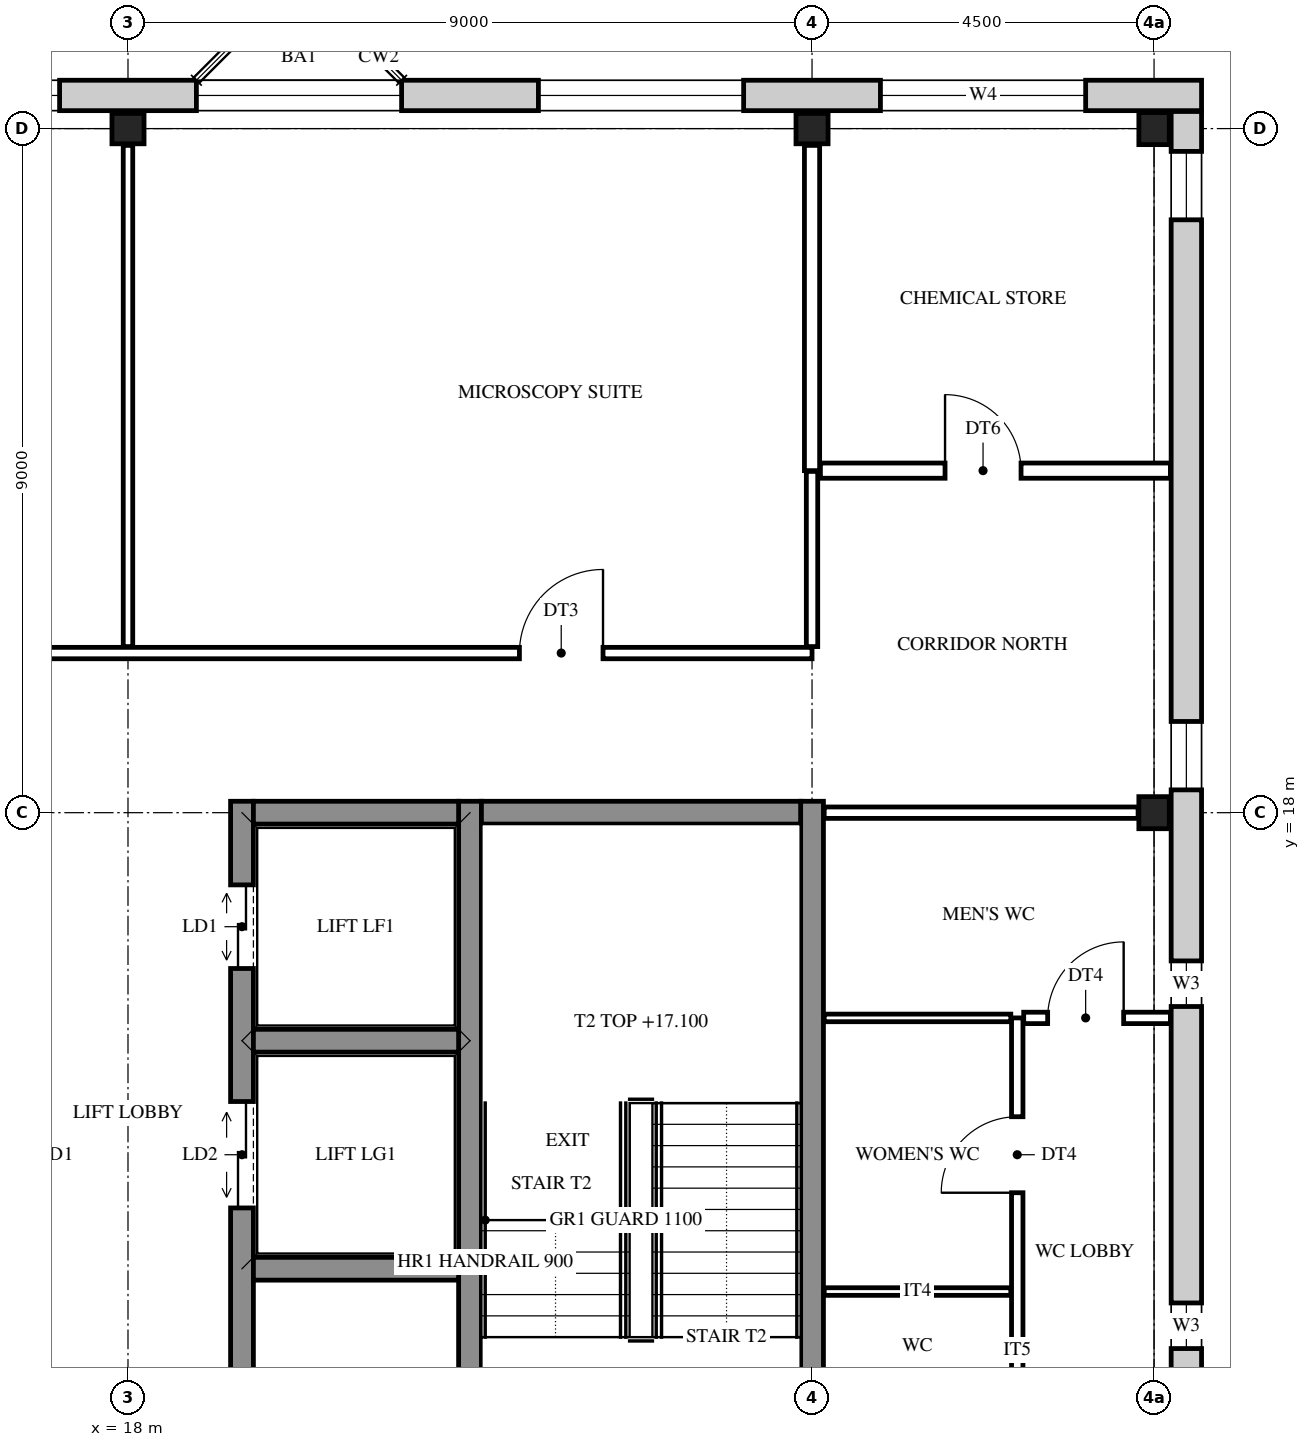
"""IFC4 building model, lengths in metres.
Left out: names, types, materials, properties, quantities, classifications, styles, units other than length and angle.
Written with IfcOpenShell. Run it as: python <this file> out.ifc"""

import sys

from ifc_helpers import new_model, si_unit, direction, frame, frame_2d, origin, origin_2d, place, context, subcontext, project, spatial, rectangle, i_section, extrude, element, fill, save


model = new_model("IFC4")
c1 = context("Model", 3, precision=1e-05, world=origin(), true_north=direction((0.0, 1.0)))
c2 = subcontext(c1, "Body", "Model", "MODEL_VIEW")
j1 = project(units=[si_unit("LENGTHUNIT", "METRE"), si_unit("PLANEANGLEUNIT", "RADIAN")], contexts=[c1])
p1 = place(None, origin())
s1 = spatial("IfcSite", under=j1, at=p1, CompositionType="ELEMENT")
p2 = place(p1, origin())
s2 = spatial("IfcBuilding", under=s1, at=p2, CompositionType="ELEMENT")
p3 = place(p2, frame((0.0, 0.0, 15.0)))
s3 = spatial("IfcBuildingStorey", under=s2, at=p3, CompositionType="ELEMENT", Elevation=15.0)
for number, where, z_axis, x_axis in (
    (1, (18.0, 27.0, 0.0), (0.0, 0.0, 1.0), (0.0, 1.0, 0.0)),
    (2, (27.0, 27.0, 0.0), (0.0, 0.0, 1.0), (0.0, 1.0, 0.0)),
    (3, (31.5, 18.0, 0.0), (0.0, 0.0, 1.0), (1.0, 0.0, 0.0)),
    (4, (31.5, 27.0, 0.0), (0.0, 0.0, 1.0), (1.0, 0.0, 0.0)),
):
    element("IfcColumn", number, at=place(p3, frame(where, z_axis=z_axis, x_axis=x_axis)), inside=s3, PredefinedType="COLUMN", context=c2, shape_type="SweptSolid", body=[
        extrude(i_section(OverallWidth=0.4, OverallDepth=0.422, WebThickness=0.028, FlangeThickness=0.036, at=origin_2d()), origin(), (0.0, 0.0, 1.0), 4.2),
    ])
p4 = place(p3, frame((19.5, 8.85, 0.0), z_axis=(0.0, 0.0, 1.0), x_axis=(0.0, 1.0, 0.0)))
e5 = element("IfcWall", 5, at=p4, inside=s3, PredefinedType="SHEAR", context=c2, shape_type="SweptSolid", body=[
    extrude(rectangle(XDim=9.3, YDim=0.3, at=frame_2d((4.65, 0.0))), origin(), (0.0, 0.0, 1.0), 4.2),
])
p5 = place(p4, frame((3.95, 0.0, 0.0)))
e6 = element("IfcOpeningElement", 6, at=p5, cuts=e5, PredefinedType="OPENING", context=c2, shape_type="SweptSolid", body=[
    extrude(rectangle(XDim=1.4, YDim=2.1, at=frame_2d((0.7, 1.05))), frame((0.0, 0.16, 0.0), z_axis=(0.0, -1.0, 0.0), x_axis=(1.0, 0.0, 0.0)), (0.0, 0.0, 1.0), 0.32),
])
p6 = place(p4, frame((7.1, 0.0, 0.0)))
e7 = element("IfcOpeningElement", 7, at=p6, cuts=e5, PredefinedType="OPENING", context=c2, shape_type="SweptSolid", body=[
    extrude(rectangle(XDim=1.1, YDim=2.1, at=frame_2d((0.55, 1.05))), frame((0.0, 0.16, 0.0), z_axis=(0.0, -1.0, 0.0), x_axis=(1.0, 0.0, 0.0)), (0.0, 0.0, 1.0), 0.32),
])
for number, where, z_axis, x_axis in (
    (8, (22.5, 8.85, 0.0), (0.0, 0.0, 1.0), (0.0, 1.0, 0.0)),
    (9, (27.0, 8.85, 0.0), (0.0, 0.0, 1.0), (0.0, 1.0, 0.0)),
):
    element("IfcWall", number, at=place(p3, frame(where, z_axis=z_axis, x_axis=x_axis)), inside=s3, PredefinedType="SHEAR", context=c2, shape_type="SweptSolid", body=[
        extrude(rectangle(XDim=9.3, YDim=0.3, at=frame_2d((4.65, 0.0))), origin(), (0.0, 0.0, 1.0), 4.2),
    ])
for number, where, z_axis, x_axis in (
    (10, (19.65, 12.0, 0.0), (0.0, 0.0, 1.0), (1.0, 0.0, 0.0)),
    (11, (19.65, 15.0, 0.0), (0.0, 0.0, 1.0), (1.0, 0.0, 0.0)),
    (12, (19.65, 18.0, 0.0), (0.0, 0.0, 1.0), (1.0, 0.0, 0.0)),
):
    element("IfcWall", number, at=place(p3, frame(where, z_axis=z_axis, x_axis=x_axis)), inside=s3, PredefinedType="SHEAR", context=c2, shape_type="SweptSolid", body=[
        extrude(rectangle(XDim=2.7, YDim=0.3, at=frame_2d((1.35, 0.0))), origin(), (0.0, 0.0, 1.0), 4.2),
    ])
p7 = place(p3, frame((22.65, 18.0, 0.0), z_axis=(0.0, 0.0, 1.0), x_axis=(1.0, 0.0, 0.0)))
e13 = element("IfcWall", 13, at=p7, inside=s3, PredefinedType="SHEAR", context=c2, shape_type="SweptSolid", body=[
    extrude(rectangle(XDim=4.2, YDim=0.3, at=frame_2d((2.1, 0.0))), origin(), (0.0, 0.0, 1.0), 4.2),
])
p8 = place(p3, frame((-0.625, 27.436, 0.0), z_axis=(0.0, 0.0, 1.0), x_axis=(1.0, 0.0, 0.0)))
e14 = element("IfcWall", 14, at=p8, inside=s3, PredefinedType="STANDARD", context=c2, shape_type="SweptSolid", body=[
    extrude(rectangle(XDim=32.75, YDim=0.4, at=frame_2d((16.375, 0.0))), origin(), (0.0, 0.0, 1.0), 4.2),
])
p9 = place(p8, frame((1.525, 0.0, 0.9)))
e15 = element("IfcOpeningElement", 15, at=p9, cuts=e14, PredefinedType="OPENING", context=c2, shape_type="SweptSolid", body=[
    extrude(rectangle(XDim=2.7, YDim=2.5, at=frame_2d((1.35, 1.25))), frame((0.0, 0.21, 0.0), z_axis=(0.0, -1.0, 0.0), x_axis=(1.0, 0.0, 0.0)), (0.0, 0.0, 1.0), 0.42),
])
p10 = place(p8, frame((6.025, 0.0, 0.9)))
e16 = element("IfcOpeningElement", 16, at=p10, cuts=e14, PredefinedType="OPENING", context=c2, shape_type="SweptSolid", body=[
    extrude(rectangle(XDim=2.7, YDim=2.5, at=frame_2d((1.35, 1.25))), frame((0.0, 0.21, 0.0), z_axis=(0.0, -1.0, 0.0), x_axis=(1.0, 0.0, 0.0)), (0.0, 0.0, 1.0), 0.42),
])
p11 = place(p8, frame((10.525, 0.0, 0.9)))
e17 = element("IfcOpeningElement", 17, at=p11, cuts=e14, PredefinedType="OPENING", context=c2, shape_type="SweptSolid", body=[
    extrude(rectangle(XDim=2.7, YDim=2.5, at=frame_2d((1.35, 1.25))), frame((0.0, 0.21, 0.0), z_axis=(0.0, -1.0, 0.0), x_axis=(1.0, 0.0, 0.0)), (0.0, 0.0, 1.0), 0.42),
])
p12 = place(p8, frame((15.025, 0.0, 0.9)))
e18 = element("IfcOpeningElement", 18, at=p12, cuts=e14, PredefinedType="OPENING", context=c2, shape_type="SweptSolid", body=[
    extrude(rectangle(XDim=2.7, YDim=2.5, at=frame_2d((1.35, 1.25))), frame((0.0, 0.21, 0.0), z_axis=(0.0, -1.0, 0.0), x_axis=(1.0, 0.0, 0.0)), (0.0, 0.0, 1.0), 0.42),
])
p13 = place(p8, frame((19.525, 0.0, 0.9)))
e19 = element("IfcOpeningElement", 19, at=p13, cuts=e14, PredefinedType="OPENING", context=c2, shape_type="SweptSolid", body=[
    extrude(rectangle(XDim=2.7, YDim=2.5, at=frame_2d((1.35, 1.25))), frame((0.0, 0.21, 0.0), z_axis=(0.0, -1.0, 0.0), x_axis=(1.0, 0.0, 0.0)), (0.0, 0.0, 1.0), 0.42),
])
p14 = place(p8, frame((24.025, 0.0, 0.9)))
e20 = element("IfcOpeningElement", 20, at=p14, cuts=e14, PredefinedType="OPENING", context=c2, shape_type="SweptSolid", body=[
    extrude(rectangle(XDim=2.7, YDim=2.5, at=frame_2d((1.35, 1.25))), frame((0.0, 0.21, 0.0), z_axis=(0.0, -1.0, 0.0), x_axis=(1.0, 0.0, 0.0)), (0.0, 0.0, 1.0), 0.42),
])
p15 = place(p8, frame((28.525, 0.0, 0.9)))
e21 = element("IfcOpeningElement", 21, at=p15, cuts=e14, PredefinedType="OPENING", context=c2, shape_type="SweptSolid", body=[
    extrude(rectangle(XDim=2.7, YDim=2.5, at=frame_2d((1.35, 1.25))), frame((0.0, 0.21, 0.0), z_axis=(0.0, -1.0, 0.0), x_axis=(1.0, 0.0, 0.0)), (0.0, 0.0, 1.0), 0.42),
])
p16 = place(p3, frame((31.925, 27.225, 0.0), z_axis=(0.0, 0.0, 1.0), x_axis=(0.0, -1.0, 0.0)))
e22 = element("IfcWall", 22, at=p16, inside=s3, PredefinedType="STANDARD", context=c2, shape_type="SweptSolid", body=[
    extrude(rectangle(XDim=27.45, YDim=0.4, at=frame_2d((13.725, 0.0))), origin(), (0.0, 0.0, 1.0), 4.2),
])
p17 = place(p16, frame((26.025, 0.0, 0.9)))
e23 = element("IfcOpeningElement", 23, at=p17, cuts=e22, PredefinedType="OPENING", context=c2, shape_type="SweptSolid", body=[
    extrude(rectangle(XDim=0.9, YDim=2.0, at=frame_2d((0.45, 1.0))), frame((0.0, 0.21, 0.0), z_axis=(0.0, -1.0, 0.0), x_axis=(1.0, 0.0, 0.0)), (0.0, 0.0, 1.0), 0.42),
])
p18 = place(p16, frame((18.525, 0.0, 0.9)))
e24 = element("IfcOpeningElement", 24, at=p18, cuts=e22, PredefinedType="OPENING", context=c2, shape_type="SweptSolid", body=[
    extrude(rectangle(XDim=0.9, YDim=2.0, at=frame_2d((0.45, 1.0))), frame((0.0, 0.21, 0.0), z_axis=(0.0, -1.0, 0.0), x_axis=(1.0, 0.0, 0.0)), (0.0, 0.0, 1.0), 0.42),
])
p19 = place(p16, frame((15.675, 0.0, 1.6)))
e25 = element("IfcOpeningElement", 25, at=p19, cuts=e22, PredefinedType="OPENING", context=c2, shape_type="SweptSolid", body=[
    extrude(rectangle(XDim=0.6, YDim=0.9, at=frame_2d((0.3, 0.45))), frame((0.0, 0.21, 0.0), z_axis=(0.0, -1.0, 0.0), x_axis=(1.0, 0.0, 0.0)), (0.0, 0.0, 1.0), 0.42),
])
p20 = place(p16, frame((11.175, 0.0, 1.6)))
e26 = element("IfcOpeningElement", 26, at=p20, cuts=e22, PredefinedType="OPENING", context=c2, shape_type="SweptSolid", body=[
    extrude(rectangle(XDim=0.6, YDim=0.9, at=frame_2d((0.3, 0.45))), frame((0.0, 0.21, 0.0), z_axis=(0.0, -1.0, 0.0), x_axis=(1.0, 0.0, 0.0)), (0.0, 0.0, 1.0), 0.42),
])
p21 = place(p16, frame((8.025, 0.0, 0.9)))
e27 = element("IfcOpeningElement", 27, at=p21, cuts=e22, PredefinedType="OPENING", context=c2, shape_type="SweptSolid", body=[
    extrude(rectangle(XDim=0.9, YDim=2.0, at=frame_2d((0.45, 1.0))), frame((0.0, 0.21, 0.0), z_axis=(0.0, -1.0, 0.0), x_axis=(1.0, 0.0, 0.0)), (0.0, 0.0, 1.0), 0.42),
])
p22 = place(p16, frame((0.525, 0.0, 0.9)))
e28 = element("IfcOpeningElement", 28, at=p22, cuts=e22, PredefinedType="OPENING", context=c2, shape_type="SweptSolid", body=[
    extrude(rectangle(XDim=0.9, YDim=2.0, at=frame_2d((0.45, 1.0))), frame((0.0, 0.21, 0.0), z_axis=(0.0, -1.0, 0.0), x_axis=(1.0, 0.0, 0.0)), (0.0, 0.0, 1.0), 0.42),
])
p23 = place(p3, frame((18.0, 20.185, 0.0), z_axis=(0.0, 0.0, 1.0), x_axis=(0.0, 1.0, 0.0)))
e29 = element("IfcWall", 29, at=p23, inside=s3, PredefinedType="PARTITIONING", context=c2, shape_type="SweptSolid", body=[
    extrude(rectangle(XDim=6.594, YDim=0.125, at=frame_2d((3.297, 0.0))), origin(), (0.0, 0.0, 1.0), 3.537),
])
p24 = place(p3, frame((27.0, 20.185, 0.0), z_axis=(0.0, 0.0, 1.0), x_axis=(0.0, 1.0, 0.0)))
e30 = element("IfcWall", 30, at=p24, inside=s3, PredefinedType="PARTITIONING", context=c2, shape_type="SweptSolid", body=[
    extrude(rectangle(XDim=2.305, YDim=0.15, at=frame_2d((1.152, 0.0))), origin(), (0.0, 0.0, 1.0), 3.537),
])
p25 = place(p3, frame((27.0, 22.5, 0.0), z_axis=(0.0, 0.0, 1.0), x_axis=(0.0, 1.0, 0.0)))
e31 = element("IfcWall", 31, at=p25, inside=s3, PredefinedType="PARTITIONING", context=c2, shape_type="SweptSolid", body=[
    extrude(rectangle(XDim=4.279, YDim=0.2, at=frame_2d((2.14, 0.0))), origin(), (0.0, 0.0, 1.0), 3.537),
])
p26 = place(p3, frame((29.7, 9.0, 0.0), z_axis=(0.0, 0.0, 1.0), x_axis=(0.0, 1.0, 0.0)))
e32 = element("IfcWall", 32, at=p26, inside=s3, PredefinedType="PARTITIONING", context=c2, shape_type="SweptSolid", body=[
    extrude(rectangle(XDim=6.3, YDim=0.15, at=frame_2d((3.15, 0.0))), origin(), (0.0, 0.0, 1.0), 3.537),
])
p27 = place(p26, frame((4.0, 0.0, 0.0)))
e33 = element("IfcOpeningElement", 33, at=p27, cuts=e32, PredefinedType="OPENING", context=c2, shape_type="SweptSolid", body=[
    extrude(rectangle(XDim=1.0, YDim=2.1, at=frame_2d((0.5, 1.05))), frame((0.0, 0.085, 0.0), z_axis=(0.0, -1.0, 0.0), x_axis=(1.0, 0.0, 0.0)), (0.0, 0.0, 1.0), 0.17),
])
for number, where, z_axis, x_axis in (
    (34, (27.16, 11.7, 0.0), (0.0, 0.0, 1.0), (1.0, 0.0, 0.0)),
    (35, (27.16, 15.3, 0.0), (0.0, 0.0, 1.0), (1.0, 0.0, 0.0)),
):
    element("IfcWall", number, at=place(p3, frame(where, z_axis=z_axis, x_axis=x_axis)), inside=s3, PredefinedType="PARTITIONING", context=c2, shape_type="SweptSolid", body=[
        extrude(rectangle(XDim=2.455, YDim=0.1, at=frame_2d((1.228, 0.0))), origin(), (0.0, 0.0, 1.0), 3.537),
    ])
p28 = place(p3, frame((29.785, 15.3, 0.0), z_axis=(0.0, 0.0, 1.0), x_axis=(1.0, 0.0, 0.0)))
e36 = element("IfcWall", 36, at=p28, inside=s3, PredefinedType="PARTITIONING", context=c2, shape_type="SweptSolid", body=[
    extrude(rectangle(XDim=1.93, YDim=0.15, at=frame_2d((0.965, 0.0))), origin(), (0.0, 0.0, 1.0), 3.537),
])
p29 = place(p28, frame((0.315, 0.0, 0.0)))
e37 = element("IfcOpeningElement", 37, at=p29, cuts=e36, PredefinedType="OPENING", context=c2, shape_type="SweptSolid", body=[
    extrude(rectangle(XDim=1.0, YDim=2.1, at=frame_2d((0.5, 1.05))), frame((0.0, 0.085, 0.0), z_axis=(0.0, -1.0, 0.0), x_axis=(1.0, 0.0, 0.0)), (0.0, 0.0, 1.0), 0.17),
])
p30 = place(p3, frame((27.16, 18.0, 0.0), z_axis=(0.0, 0.0, 1.0), x_axis=(1.0, 0.0, 0.0)))
e38 = element("IfcWall", 38, at=p30, inside=s3, PredefinedType="PARTITIONING", context=c2, shape_type="SweptSolid", body=[
    extrude(rectangle(XDim=4.13, YDim=0.15, at=frame_2d((2.065, 0.0))), origin(), (0.0, 0.0, 1.0), 3.537),
])
p31 = place(p3, frame((6.9, 20.1, 0.0), z_axis=(0.0, 0.0, 1.0), x_axis=(1.0, 0.0, 0.0)))
e39 = element("IfcWall", 39, at=p31, inside=s3, PredefinedType="PARTITIONING", context=c2, shape_type="SweptSolid", body=[
    extrude(rectangle(XDim=20.1, YDim=0.15, at=frame_2d((10.05, 0.0))), origin(), (0.0, 0.0, 1.0), 3.537),
])
p32 = place(p31, frame((0.15, 0.0, 0.0)))
e40 = element("IfcOpeningElement", 40, at=p32, cuts=e39, PredefinedType="OPENING", context=c2, shape_type="SweptSolid", body=[
    extrude(rectangle(XDim=1.1, YDim=2.1, at=frame_2d((0.55, 1.05))), frame((0.0, 0.085, 0.0), z_axis=(0.0, -1.0, 0.0), x_axis=(1.0, 0.0, 0.0)), (0.0, 0.0, 1.0), 0.17),
])
p33 = place(p31, frame((6.05, 0.0, 0.0)))
e41 = element("IfcOpeningElement", 41, at=p33, cuts=e39, PredefinedType="OPENING", context=c2, shape_type="SweptSolid", body=[
    extrude(rectangle(XDim=1.1, YDim=2.1, at=frame_2d((0.55, 1.05))), frame((0.0, 0.085, 0.0), z_axis=(0.0, -1.0, 0.0), x_axis=(1.0, 0.0, 0.0)), (0.0, 0.0, 1.0), 0.17),
])
p34 = place(p31, frame((16.25, 0.0, 0.0)))
e42 = element("IfcOpeningElement", 42, at=p34, cuts=e39, PredefinedType="OPENING", context=c2, shape_type="SweptSolid", body=[
    extrude(rectangle(XDim=1.1, YDim=2.1, at=frame_2d((0.55, 1.05))), frame((0.0, 0.085, 0.0), z_axis=(0.0, -1.0, 0.0), x_axis=(1.0, 0.0, 0.0)), (0.0, 0.0, 1.0), 0.17),
])
p35 = place(p3, frame((27.11, 22.5, 0.0), z_axis=(0.0, 0.0, 1.0), x_axis=(1.0, 0.0, 0.0)))
e43 = element("IfcWall", 43, at=p35, inside=s3, PredefinedType="PARTITIONING", context=c2, shape_type="SweptSolid", body=[
    extrude(rectangle(XDim=4.605, YDim=0.2, at=frame_2d((2.302, 0.0))), origin(), (0.0, 0.0, 1.0), 3.537),
])
p36 = place(p35, frame((1.64, 0.0, 0.0)))
e44 = element("IfcOpeningElement", 44, at=p36, cuts=e43, PredefinedType="OPENING", context=c2, shape_type="SweptSolid", body=[
    extrude(rectangle(XDim=1.0, YDim=2.1, at=frame_2d((0.5, 1.05))), frame((0.0, 0.11, 0.0), z_axis=(0.0, -1.0, 0.0), x_axis=(1.0, 0.0, 0.0)), (0.0, 0.0, 1.0), 0.22),
])
p37 = place(p12, origin())
e45 = element("IfcWindow", 45, at=p37, inside=s3, PartitioningType="SINGLE_PANEL", PredefinedType="WINDOW", context=c2, shape_type="SweptSolid", body=[
    extrude(rectangle(XDim=2.7, YDim=2.5, at=frame_2d((1.35, 1.25))), frame((0.0, 0.03, 0.0), z_axis=(0.0, -1.0, 0.0), x_axis=(1.0, 0.0, 0.0)), (0.0, 0.0, 1.0), 0.06),
])
fill(e18, e45)
p38 = place(p13, origin())
e46 = element("IfcWindow", 46, at=p38, inside=s3, PartitioningType="SINGLE_PANEL", PredefinedType="WINDOW", context=c2, shape_type="SweptSolid", body=[
    extrude(rectangle(XDim=2.7, YDim=2.5, at=frame_2d((1.35, 1.25))), frame((0.0, 0.03, 0.0), z_axis=(0.0, -1.0, 0.0), x_axis=(1.0, 0.0, 0.0)), (0.0, 0.0, 1.0), 0.06),
])
fill(e19, e46)
p39 = place(p14, origin())
e47 = element("IfcWindow", 47, at=p39, inside=s3, PartitioningType="SINGLE_PANEL", PredefinedType="WINDOW", context=c2, shape_type="SweptSolid", body=[
    extrude(rectangle(XDim=2.7, YDim=2.5, at=frame_2d((1.35, 1.25))), frame((0.0, 0.03, 0.0), z_axis=(0.0, -1.0, 0.0), x_axis=(1.0, 0.0, 0.0)), (0.0, 0.0, 1.0), 0.06),
])
fill(e20, e47)
p40 = place(p15, origin())
e48 = element("IfcWindow", 48, at=p40, inside=s3, PartitioningType="SINGLE_PANEL", PredefinedType="WINDOW", context=c2, shape_type="SweptSolid", body=[
    extrude(rectangle(XDim=2.7, YDim=2.5, at=frame_2d((1.35, 1.25))), frame((0.0, 0.03, 0.0), z_axis=(0.0, -1.0, 0.0), x_axis=(1.0, 0.0, 0.0)), (0.0, 0.0, 1.0), 0.06),
])
fill(e21, e48)
p41 = place(p19, origin())
e49 = element("IfcWindow", 49, at=p41, inside=s3, PartitioningType="SINGLE_PANEL", PredefinedType="WINDOW", context=c2, shape_type="SweptSolid", body=[
    extrude(rectangle(XDim=0.6, YDim=0.9, at=frame_2d((0.3, 0.45))), frame((0.0, 0.03, 0.0), z_axis=(0.0, -1.0, 0.0), x_axis=(1.0, 0.0, 0.0)), (0.0, 0.0, 1.0), 0.06),
])
fill(e25, e49)
p42 = place(p20, origin())
e50 = element("IfcWindow", 50, at=p42, inside=s3, PartitioningType="SINGLE_PANEL", PredefinedType="WINDOW", context=c2, shape_type="SweptSolid", body=[
    extrude(rectangle(XDim=0.6, YDim=0.9, at=frame_2d((0.3, 0.45))), frame((0.0, 0.03, 0.0), z_axis=(0.0, -1.0, 0.0), x_axis=(1.0, 0.0, 0.0)), (0.0, 0.0, 1.0), 0.06),
])
fill(e26, e50)
p43 = place(p21, origin())
e51 = element("IfcWindow", 51, at=p43, inside=s3, PartitioningType="SINGLE_PANEL", PredefinedType="WINDOW", context=c2, shape_type="SweptSolid", body=[
    extrude(rectangle(XDim=0.9, YDim=2.0, at=frame_2d((0.45, 1.0))), frame((0.0, 0.03, 0.0), z_axis=(0.0, -1.0, 0.0), x_axis=(1.0, 0.0, 0.0)), (0.0, 0.0, 1.0), 0.06),
])
fill(e27, e51)
p44 = place(p22, origin())
e52 = element("IfcWindow", 52, at=p44, inside=s3, PartitioningType="SINGLE_PANEL", PredefinedType="WINDOW", context=c2, shape_type="SweptSolid", body=[
    extrude(rectangle(XDim=0.9, YDim=2.0, at=frame_2d((0.45, 1.0))), frame((0.0, 0.03, 0.0), z_axis=(0.0, -1.0, 0.0), x_axis=(1.0, 0.0, 0.0)), (0.0, 0.0, 1.0), 0.06),
])
fill(e28, e52)
p45 = place(p27, origin())
e53 = element("IfcDoor", 53, at=p45, inside=s3, OperationType="SINGLE_SWING_LEFT", PredefinedType="DOOR", context=c2, shape_type="SweptSolid", body=[
    extrude(rectangle(XDim=1.0, YDim=2.1, at=frame_2d((0.5, 1.05))), frame((0.0, 0.025, 0.0), z_axis=(0.0, -1.0, 0.0), x_axis=(1.0, 0.0, 0.0)), (0.0, 0.0, 1.0), 0.05),
])
fill(e33, e53)
p46 = place(p29, origin())
e54 = element("IfcDoor", 54, at=p46, inside=s3, OperationType="SINGLE_SWING_RIGHT", PredefinedType="DOOR", context=c2, shape_type="SweptSolid", body=[
    extrude(rectangle(XDim=1.0, YDim=2.1, at=frame_2d((0.5, 1.05))), frame((0.0, 0.025, 0.0), z_axis=(0.0, -1.0, 0.0), x_axis=(1.0, 0.0, 0.0)), (0.0, 0.0, 1.0), 0.05),
])
fill(e37, e54)
p47 = place(p34, origin())
e55 = element("IfcDoor", 55, at=p47, inside=s3, OperationType="SINGLE_SWING_RIGHT", PredefinedType="DOOR", context=c2, shape_type="SweptSolid", body=[
    extrude(rectangle(XDim=1.1, YDim=2.1, at=frame_2d((0.55, 1.05))), frame((0.0, 0.025, 0.0), z_axis=(0.0, -1.0, 0.0), x_axis=(1.0, 0.0, 0.0)), (0.0, 0.0, 1.0), 0.05),
])
fill(e42, e55)
p48 = place(p36, origin())
e56 = element("IfcDoor", 56, at=p48, inside=s3, OperationType="SINGLE_SWING_LEFT", PredefinedType="DOOR", context=c2, shape_type="SweptSolid", body=[
    extrude(rectangle(XDim=1.0, YDim=2.1, at=frame_2d((0.5, 1.05))), frame((0.0, 0.025, 0.0), z_axis=(0.0, -1.0, 0.0), x_axis=(1.0, 0.0, 0.0)), (0.0, 0.0, 1.0), 0.05),
])
fill(e44, e56)
p49 = place(p5, origin())
e57 = element("IfcDoor", 57, at=p49, inside=s3, OperationType="DOUBLE_DOOR_SLIDING", PredefinedType="DOOR", context=c2, shape_type="SweptSolid", body=[
    extrude(rectangle(XDim=1.4, YDim=2.1, at=frame_2d((0.7, 1.05))), frame((0.0, 0.025, 0.0), z_axis=(0.0, -1.0, 0.0), x_axis=(1.0, 0.0, 0.0)), (0.0, 0.0, 1.0), 0.05),
])
fill(e6, e57)
p50 = place(p6, origin())
e58 = element("IfcDoor", 58, at=p50, inside=s3, OperationType="DOUBLE_DOOR_SLIDING", PredefinedType="DOOR", context=c2, shape_type="SweptSolid", body=[
    extrude(rectangle(XDim=1.1, YDim=2.1, at=frame_2d((0.55, 1.05))), frame((0.0, 0.025, 0.0), z_axis=(0.0, -1.0, 0.0), x_axis=(1.0, 0.0, 0.0)), (0.0, 0.0, 1.0), 0.05),
])
fill(e7, e58)
save(model, sys.argv[1])
